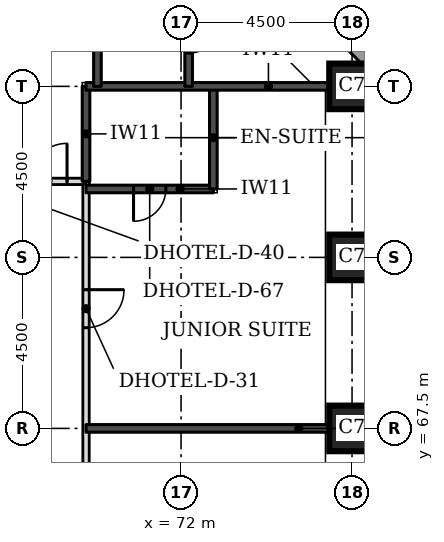
"""IFC4 building model, lengths in metres.
Left out: names, types, materials, properties, quantities, classifications, styles, units other than length and angle.
Written with IfcOpenShell. Run it as: python <this file> out.ifc"""

import sys

from ifc_helpers import new_model, si_unit, direction, frame, frame_2d, origin, origin_2d, place, context, subcontext, project, spatial, rectangle, extrude, element, fill, save


model = new_model("IFC4")
c1 = context("Model", 3, precision=1e-05, world=origin(), true_north=direction((0.0, 1.0)))
c2 = subcontext(c1, "Body", "Model", "MODEL_VIEW")
j1 = project(units=[si_unit("LENGTHUNIT", "METRE"), si_unit("PLANEANGLEUNIT", "RADIAN")], contexts=[c1])
p1 = place(None, origin())
s1 = spatial("IfcSite", under=j1, at=p1, CompositionType="ELEMENT")
p2 = place(p1, origin())
s2 = spatial("IfcBuilding", under=s1, at=p2, CompositionType="ELEMENT")
p3 = place(p2, frame((0.0, 0.0, 36.3)))
s3 = spatial("IfcBuildingStorey", under=s2, at=p3, CompositionType="ELEMENT", Elevation=36.3)
for number, where, z_axis, x_axis in (
    (1, (76.5, 67.5, 0.0), (0.0, 0.0, 1.0), (1.0, 0.0, 0.0)),
    (2, (76.5, 72.0, 0.0), (0.0, 0.0, 1.0), (1.0, 0.0, 0.0)),
    (3, (76.5, 76.5, 0.0), (0.0, 0.0, 1.0), (1.0, 0.0, 0.0)),
):
    element("IfcColumn", number, at=place(p3, frame(where, z_axis=z_axis, x_axis=x_axis)), inside=s3, PredefinedType="COLUMN", context=c2, shape_type="SweptSolid", body=[
        extrude(rectangle(XDim=1.2, YDim=1.2, at=origin_2d()), origin(), (0.0, 0.0, 1.0), 3.3),
    ])
p4 = place(p3, frame((77.326, 76.77, 0.0), z_axis=(0.0, 0.0, 1.0), x_axis=(-0.707106781187, 0.707106781187, 0.0)))
e4 = element("IfcWall", 4, at=p4, inside=s3, PredefinedType="STANDARD", context=c2, shape_type="SweptSolid", body=[
    extrude(rectangle(XDim=7.151, YDim=0.35, at=frame_2d((3.576, 0.0))), origin(), (0.0, 0.0, 1.0), 3.055),
])
p5 = place(p4, frame((1.926, 0.0, 0.8)))
e5 = element("IfcOpeningElement", 5, at=p5, cuts=e4, PredefinedType="OPENING", context=c2, shape_type="SweptSolid", body=[
    extrude(rectangle(XDim=3.3, YDim=1.5, at=frame_2d((1.65, 0.75))), frame((0.0, 0.185, 0.0), z_axis=(0.0, -1.0, 0.0), x_axis=(1.0, 0.0, 0.0)), (0.0, 0.0, 1.0), 0.37),
])
p6 = place(p3, frame((69.5, 47.5, 0.0), z_axis=(0.0, 0.0, 1.0), x_axis=(0.0, 1.0, 0.0)))
e6 = element("IfcWall", 6, at=p6, inside=s3, PredefinedType="PARTITIONING", context=c2, shape_type="SweptSolid", body=[
    extrude(rectangle(XDim=26.5, YDim=0.15, at=frame_2d((13.25, 0.0))), origin(), (0.0, 0.0, 1.0), 3.08),
])
p7 = place(p6, frame((22.65, 0.0, 0.0)))
e7 = element("IfcOpeningElement", 7, at=p7, cuts=e6, PredefinedType="OPENING", context=c2, shape_type="SweptSolid", body=[
    extrude(rectangle(XDim=1.0, YDim=2.1, at=frame_2d((0.5, 1.05))), frame((0.0, 0.085, 0.0), z_axis=(0.0, -1.0, 0.0), x_axis=(1.0, 0.0, 0.0)), (0.0, 0.0, 1.0), 0.17),
])
p8 = place(p6, frame((16.6, 0.0, 0.0)))
e8 = element("IfcOpeningElement", 8, at=p8, cuts=e6, PredefinedType="OPENING", context=c2, shape_type="SweptSolid", body=[
    extrude(rectangle(XDim=1.0, YDim=2.1, at=frame_2d((0.5, 1.05))), frame((0.0, 0.085, 0.0), z_axis=(0.0, -1.0, 0.0), x_axis=(1.0, 0.0, 0.0)), (0.0, 0.0, 1.0), 0.17),
])
p9 = place(p6, frame((4.25, 0.0, 0.0)))
e9 = element("IfcOpeningElement", 9, at=p9, cuts=e6, PredefinedType="OPENING", context=c2, shape_type="SweptSolid", body=[
    extrude(rectangle(XDim=1.1, YDim=2.1, at=frame_2d((0.55, 1.05))), frame((0.0, 0.085, 0.0), z_axis=(0.0, -1.0, 0.0), x_axis=(1.0, 0.0, 0.0)), (0.0, 0.0, 1.0), 0.17),
])
p10 = place(p6, frame((0.55, 0.0, 0.0)))
e10 = element("IfcOpeningElement", 10, at=p10, cuts=e6, PredefinedType="OPENING", context=c2, shape_type="SweptSolid", body=[
    extrude(rectangle(XDim=1.0, YDim=2.1, at=frame_2d((0.5, 1.05))), frame((0.0, 0.085, 0.0), z_axis=(0.0, -1.0, 0.0), x_axis=(1.0, 0.0, 0.0)), (0.0, 0.0, 1.0), 0.17),
])
p11 = place(p3, frame((43.0, 74.0, 0.0), z_axis=(0.0, 0.0, 1.0), x_axis=(1.0, 0.0, 0.0)))
e11 = element("IfcWall", 11, at=p11, inside=s3, PredefinedType="PARTITIONING", context=c2, shape_type="SweptSolid", body=[
    extrude(rectangle(XDim=26.5, YDim=0.15, at=frame_2d((13.25, 0.0))), origin(), (0.0, 0.0, 1.0), 3.08),
])
p12 = place(p11, frame((7.6, 0.0, 0.0)))
e12 = element("IfcOpeningElement", 12, at=p12, cuts=e11, PredefinedType="OPENING", context=c2, shape_type="SweptSolid", body=[
    extrude(rectangle(XDim=1.0, YDim=2.1, at=frame_2d((0.5, 1.05))), frame((0.0, 0.085, 0.0), z_axis=(0.0, -1.0, 0.0), x_axis=(1.0, 0.0, 0.0)), (0.0, 0.0, 1.0), 0.17),
])
p13 = place(p11, frame((13.65, 0.0, 0.0)))
e13 = element("IfcOpeningElement", 13, at=p13, cuts=e11, PredefinedType="OPENING", context=c2, shape_type="SweptSolid", body=[
    extrude(rectangle(XDim=1.0, YDim=2.1, at=frame_2d((0.5, 1.05))), frame((0.0, 0.085, 0.0), z_axis=(0.0, -1.0, 0.0), x_axis=(1.0, 0.0, 0.0)), (0.0, 0.0, 1.0), 0.17),
])
p14 = place(p11, frame((23.05, 0.0, 0.0)))
e14 = element("IfcOpeningElement", 14, at=p14, cuts=e11, PredefinedType="OPENING", context=c2, shape_type="SweptSolid", body=[
    extrude(rectangle(XDim=1.0, YDim=2.1, at=frame_2d((0.5, 1.05))), frame((0.0, 0.085, 0.0), z_axis=(0.0, -1.0, 0.0), x_axis=(1.0, 0.0, 0.0)), (0.0, 0.0, 1.0), 0.17),
])
p15 = place(p11, frame((0.5, 0.0, 0.0)))
e15 = element("IfcOpeningElement", 15, at=p15, cuts=e11, PredefinedType="OPENING", context=c2, shape_type="SweptSolid", body=[
    extrude(rectangle(XDim=1.0, YDim=2.1, at=frame_2d((0.5, 1.05))), frame((0.0, 0.085, 0.0), z_axis=(0.0, -1.0, 0.0), x_axis=(1.0, 0.0, 0.0)), (0.0, 0.0, 1.0), 0.17),
])
p16 = place(p11, frame((25.0, 0.0, 0.0)))
e16 = element("IfcOpeningElement", 16, at=p16, cuts=e11, PredefinedType="OPENING", context=c2, shape_type="SweptSolid", body=[
    extrude(rectangle(XDim=1.0, YDim=2.1, at=frame_2d((0.5, 1.05))), frame((0.0, 0.085, 0.0), z_axis=(0.0, -1.0, 0.0), x_axis=(1.0, 0.0, 0.0)), (0.0, 0.0, 1.0), 0.17),
])
p17 = place(p3, frame((69.5, 67.5, 0.0), z_axis=(0.0, 0.0, 1.0), x_axis=(1.0, 0.0, 0.0)))
e17 = element("IfcWall", 17, at=p17, inside=s3, PredefinedType="SOLIDWALL", context=c2, shape_type="SweptSolid", body=[
    extrude(rectangle(XDim=6.4, YDim=0.2, at=frame_2d((3.2, 0.0))), origin(), (0.0, 0.0, 1.0), 3.08),
])
p18 = place(p3, frame((69.5, 73.8, 0.0), z_axis=(0.0, 0.0, 1.0), x_axis=(1.0, 0.0, 0.0)))
e18 = element("IfcWall", 18, at=p18, inside=s3, PredefinedType="SOLIDWALL", context=c2, shape_type="SweptSolid", body=[
    extrude(rectangle(XDim=3.35, YDim=0.2, at=frame_2d((1.675, 0.0))), origin(), (0.0, 0.0, 1.0), 3.08),
])
p19 = place(p18, frame((1.25, 0.0, 0.0)))
e19 = element("IfcOpeningElement", 19, at=p19, cuts=e18, PredefinedType="OPENING", context=c2, shape_type="SweptSolid", body=[
    extrude(rectangle(XDim=0.85, YDim=2.1, at=frame_2d((0.425, 1.05))), frame((0.0, 0.11, 0.0), z_axis=(0.0, -1.0, 0.0), x_axis=(1.0, 0.0, 0.0)), (0.0, 0.0, 1.0), 0.22),
])
p20 = place(p3, frame((72.85, 73.8, 0.0), z_axis=(0.0, 0.0, 1.0), x_axis=(0.0, 1.0, 0.0)))
e20 = element("IfcWall", 20, at=p20, inside=s3, PredefinedType="SOLIDWALL", context=c2, shape_type="SweptSolid", body=[
    extrude(rectangle(XDim=2.7, YDim=0.2, at=frame_2d((1.35, 0.0))), origin(), (0.0, 0.0, 1.0), 3.08),
])
p21 = place(p3, frame((69.5, 74.0, 0.0), z_axis=(0.0, 0.0, 1.0), x_axis=(0.0, 1.0, 0.0)))
e21 = element("IfcWall", 21, at=p21, inside=s3, PredefinedType="SOLIDWALL", context=c2, shape_type="SweptSolid", body=[
    extrude(rectangle(XDim=2.5, YDim=0.2, at=frame_2d((1.25, 0.0))), origin(), (0.0, 0.0, 1.0), 3.08),
])
p22 = place(p3, frame((69.5, 76.5, 0.0), z_axis=(0.0, 0.0, 1.0), x_axis=(1.0, 0.0, 0.0)))
e22 = element("IfcWall", 22, at=p22, inside=s3, PredefinedType="SOLIDWALL", context=c2, shape_type="SweptSolid", body=[
    extrude(rectangle(XDim=6.4, YDim=0.2, at=frame_2d((3.2, 0.0))), origin(), (0.0, 0.0, 1.0), 3.08),
])
p23 = place(p3, frame((69.8, 76.5, 0.0), z_axis=(0.0, 0.0, 1.0), x_axis=(0.0, 1.0, 0.0)))
e23 = element("IfcWall", 23, at=p23, inside=s3, PredefinedType="SOLIDWALL", context=c2, shape_type="SweptSolid", body=[
    extrude(rectangle(XDim=2.5, YDim=0.2, at=frame_2d((1.25, 0.0))), origin(), (0.0, 0.0, 1.0), 3.08),
])
p24 = place(p3, frame((72.2, 76.5, 0.0), z_axis=(0.0, 0.0, 1.0), x_axis=(0.0, 1.0, 0.0)))
e24 = element("IfcWall", 24, at=p24, inside=s3, PredefinedType="SOLIDWALL", context=c2, shape_type="SweptSolid", body=[
    extrude(rectangle(XDim=2.5, YDim=0.2, at=frame_2d((1.25, 0.0))), origin(), (0.0, 0.0, 1.0), 3.08),
])
p25 = place(p24, frame((0.875, 0.0, 0.0)))
e25 = element("IfcOpeningElement", 25, at=p25, cuts=e24, PredefinedType="OPENING", context=c2, shape_type="SweptSolid", body=[
    extrude(rectangle(XDim=0.85, YDim=2.1, at=frame_2d((0.425, 1.05))), frame((0.0, 0.11, 0.0), z_axis=(0.0, -1.0, 0.0), x_axis=(1.0, 0.0, 0.0)), (0.0, 0.0, 1.0), 0.22),
])
p26 = place(p7, frame((1.0, 0.0, 0.0), z_axis=(0.0, 0.0, 1.0), x_axis=(-1.0, 0.0, 0.0)))
e26 = element("IfcDoor", 26, at=p26, inside=s3, OperationType="SINGLE_SWING_LEFT", PredefinedType="DOOR", context=c2, shape_type="SweptSolid", body=[
    extrude(rectangle(XDim=1.0, YDim=2.1, at=frame_2d((0.5, 1.05))), frame((0.0, 0.025, 0.0), z_axis=(0.0, -1.0, 0.0), x_axis=(1.0, 0.0, 0.0)), (0.0, 0.0, 1.0), 0.05),
])
fill(e7, e26)
p27 = place(p19, frame((0.85, 0.0, 0.0), z_axis=(0.0, 0.0, 1.0), x_axis=(-1.0, 0.0, 0.0)))
e27 = element("IfcDoor", 27, at=p27, inside=s3, OperationType="SINGLE_SWING_RIGHT", PredefinedType="DOOR", context=c2, shape_type="SweptSolid", body=[
    extrude(rectangle(XDim=0.85, YDim=2.1, at=frame_2d((0.425, 1.05))), frame((0.0, 0.025, 0.0), z_axis=(0.0, -1.0, 0.0), x_axis=(1.0, 0.0, 0.0)), (0.0, 0.0, 1.0), 0.05),
])
fill(e19, e27)
p28 = place(p16, origin())
e28 = element("IfcDoor", 28, at=p28, inside=s3, OperationType="SINGLE_SWING_RIGHT", PredefinedType="DOOR", context=c2, shape_type="SweptSolid", body=[
    extrude(rectangle(XDim=1.0, YDim=2.1, at=frame_2d((0.5, 1.05))), frame((0.0, 0.025, 0.0), z_axis=(0.0, -1.0, 0.0), x_axis=(1.0, 0.0, 0.0)), (0.0, 0.0, 1.0), 0.05),
])
fill(e16, e28)
p29 = place(p25, frame((0.85, 0.0, 0.0), z_axis=(0.0, 0.0, 1.0), x_axis=(-1.0, 0.0, 0.0)))
e29 = element("IfcDoor", 29, at=p29, inside=s3, OperationType="SINGLE_SWING_LEFT", PredefinedType="DOOR", context=c2, shape_type="SweptSolid", body=[
    extrude(rectangle(XDim=0.85, YDim=2.1, at=frame_2d((0.425, 1.05))), frame((0.0, 0.025, 0.0), z_axis=(0.0, -1.0, 0.0), x_axis=(1.0, 0.0, 0.0)), (0.0, 0.0, 1.0), 0.05),
])
fill(e25, e29)
save(model, sys.argv[1])
